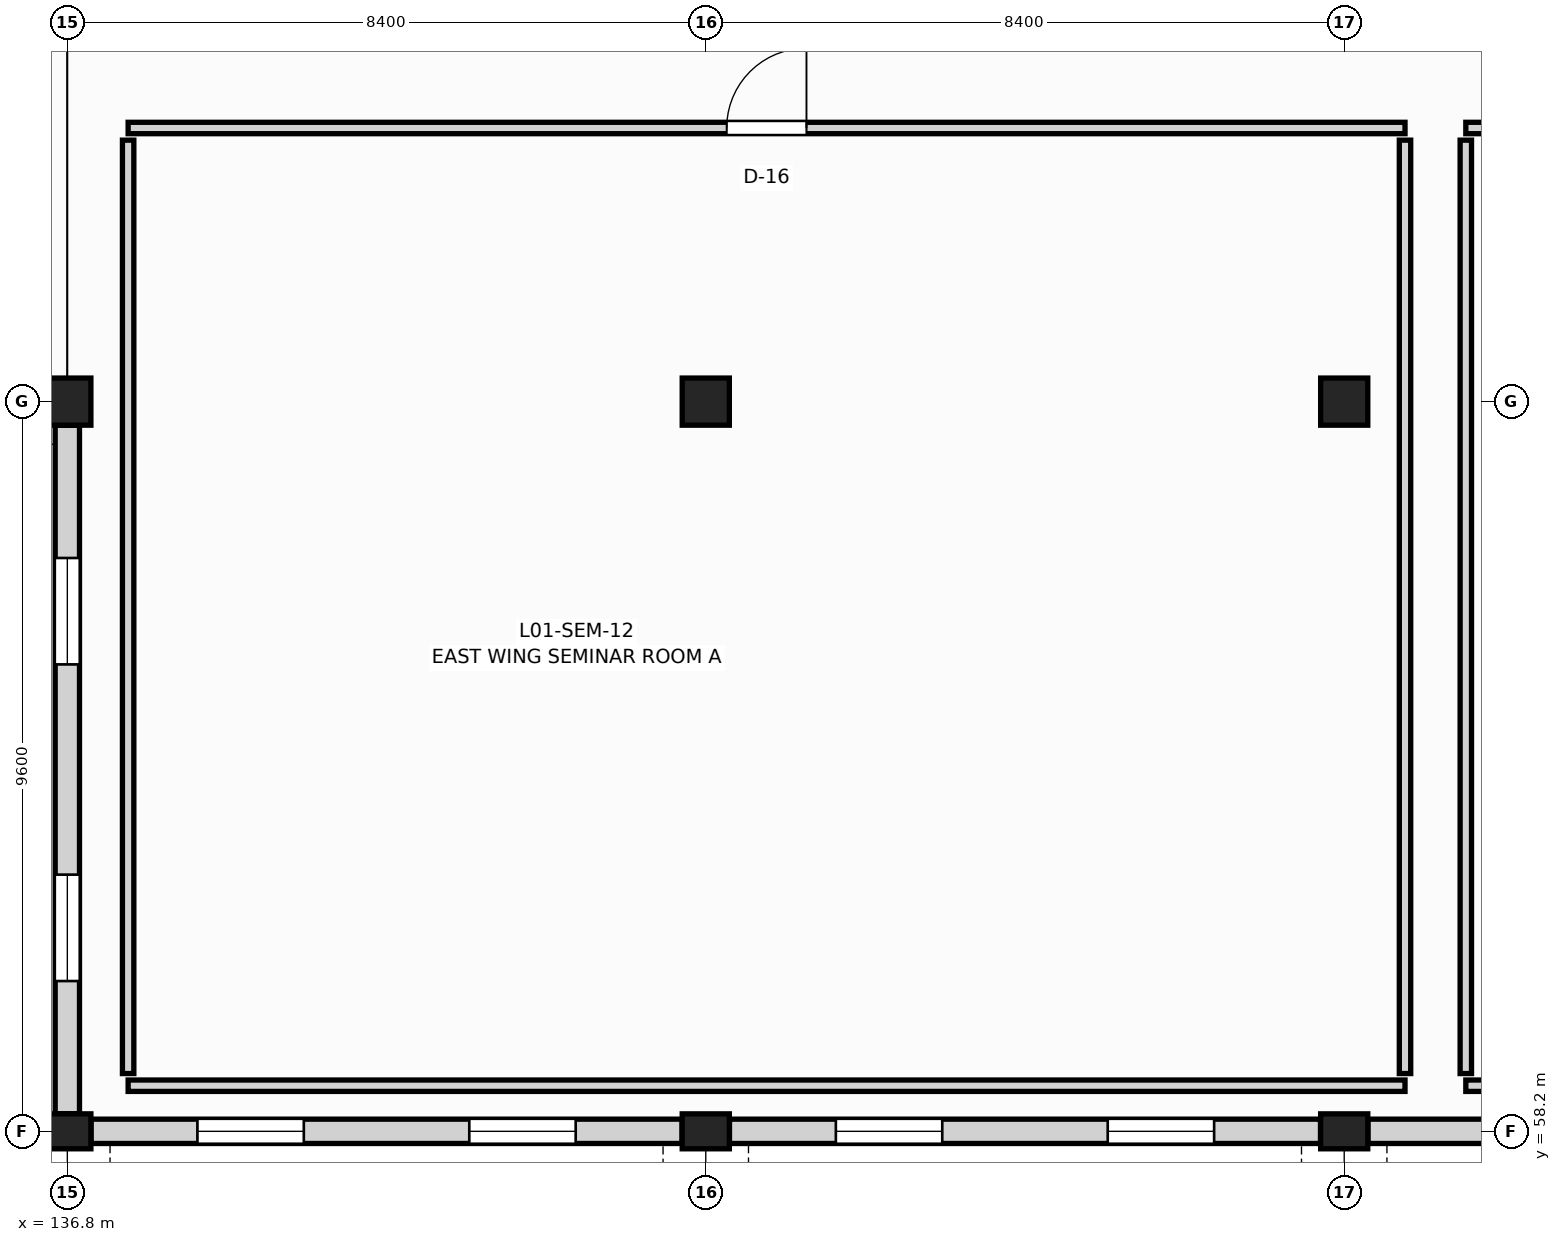
"""IFC4 building model, lengths in metres.
Left out: names, types, materials, properties, quantities, classifications, styles, units other than length and angle.
Written with IfcOpenShell. Run it as: python <this file> out.ifc"""

import sys

from ifc_helpers import new_model, si_unit, direction, frame, frame_2d, origin, origin_2d, place, context, subcontext, project, spatial, rectangle, extrude, element, fill, save


model = new_model("IFC4")
c1 = context("Model", 3, precision=1e-05, world=origin(), true_north=direction((0.0, 1.0)))
c2 = subcontext(c1, "Body", "Model", "MODEL_VIEW")
j1 = project(units=[si_unit("LENGTHUNIT", "METRE"), si_unit("PLANEANGLEUNIT", "RADIAN")], contexts=[c1])
p1 = place(None, origin())
s1 = spatial("IfcSite", under=j1, at=p1, CompositionType="ELEMENT")
p2 = place(p1, origin())
s2 = spatial("IfcBuilding", under=s1, at=p2, CompositionType="ELEMENT")
p3 = place(p2, frame((0.0, 0.0, 5.4)))
s3 = spatial("IfcBuildingStorey", under=s2, at=p3, CompositionType="ELEMENT", Elevation=5.4)
p4 = place(p3, frame((136.8, 58.2, 0.0), z_axis=(0.0, 0.0, 1.0), x_axis=(1.0, 0.0, 0.0)))
e1 = element("IfcColumn", 1, at=p4, inside=s3, PredefinedType="COLUMN", context=c2, shape_type="SweptSolid", body=[
    extrude(rectangle(XDim=0.62, YDim=0.46, at=origin_2d()), origin(), (0.0, 0.0, 1.0), 4.18),
])
p5 = place(p3, frame((136.8, 67.8, 0.0), z_axis=(0.0, 0.0, 1.0), x_axis=(1.0, 0.0, 0.0)))
e2 = element("IfcColumn", 2, at=p5, inside=s3, PredefinedType="COLUMN", context=c2, shape_type="SweptSolid", body=[
    extrude(rectangle(XDim=0.62, YDim=0.62, at=origin_2d()), origin(), (0.0, 0.0, 1.0), 4.18),
])
p6 = place(p3, frame((145.2, 58.2, 0.0), z_axis=(0.0, 0.0, 1.0), x_axis=(1.0, 0.0, 0.0)))
e3 = element("IfcColumn", 3, at=p6, inside=s3, PredefinedType="COLUMN", context=c2, shape_type="SweptSolid", body=[
    extrude(rectangle(XDim=0.62, YDim=0.46, at=origin_2d()), origin(), (0.0, 0.0, 1.0), 4.18),
])
p7 = place(p3, frame((145.2, 67.8, 0.0), z_axis=(0.0, 0.0, 1.0), x_axis=(1.0, 0.0, 0.0)))
e4 = element("IfcColumn", 4, at=p7, inside=s3, PredefinedType="COLUMN", context=c2, shape_type="SweptSolid", body=[
    extrude(rectangle(XDim=0.62, YDim=0.62, at=origin_2d()), origin(), (0.0, 0.0, 1.0), 4.18),
])
p8 = place(p3, frame((153.6, 58.2, 0.0), z_axis=(0.0, 0.0, 1.0), x_axis=(1.0, 0.0, 0.0)))
e5 = element("IfcColumn", 5, at=p8, inside=s3, PredefinedType="COLUMN", context=c2, shape_type="SweptSolid", body=[
    extrude(rectangle(XDim=0.62, YDim=0.46, at=origin_2d()), origin(), (0.0, 0.0, 1.0), 4.18),
])
p9 = place(p3, frame((153.6, 67.8, 0.0), z_axis=(0.0, 0.0, 1.0), x_axis=(1.0, 0.0, 0.0)))
e6 = element("IfcColumn", 6, at=p9, inside=s3, PredefinedType="COLUMN", context=c2, shape_type="SweptSolid", body=[
    extrude(rectangle(XDim=0.62, YDim=0.62, at=origin_2d()), origin(), (0.0, 0.0, 1.0), 4.18),
])
p10 = place(p3, frame((137.112, 58.2, 0.0), z_axis=(0.0, 0.0, 1.0), x_axis=(1.0, 0.0, 0.0)))
e7 = element("IfcWall", 7, at=p10, inside=s3, PredefinedType="SOLIDWALL", context=c2, shape_type="SweptSolid", body=[
    extrude(rectangle(XDim=7.776, YDim=0.32, at=frame_2d((3.888, 0.0))), origin(), (0.0, 0.0, 1.0), 3.38),
])
p11 = place(p10, frame((1.399, 0.0, 0.85)))
e8 = element("IfcOpeningElement", 8, at=p11, cuts=e7, PredefinedType="OPENING", context=c2, shape_type="SweptSolid", body=[
    extrude(rectangle(XDim=1.4, YDim=1.65, at=frame_2d((0.7, 0.825))), frame((0.0, 0.17, 0.0), z_axis=(0.0, -1.0, 0.0), x_axis=(1.0, 0.0, 0.0)), (0.0, 0.0, 1.0), 0.34),
])
p12 = place(p10, frame((4.977, 0.0, 0.85)))
e9 = element("IfcOpeningElement", 9, at=p12, cuts=e7, PredefinedType="OPENING", context=c2, shape_type="SweptSolid", body=[
    extrude(rectangle(XDim=1.4, YDim=1.65, at=frame_2d((0.7, 0.825))), frame((0.0, 0.17, 0.0), z_axis=(0.0, -1.0, 0.0), x_axis=(1.0, 0.0, 0.0)), (0.0, 0.0, 1.0), 0.34),
])
p13 = place(p3, frame((145.512, 58.2, 0.0), z_axis=(0.0, 0.0, 1.0), x_axis=(1.0, 0.0, 0.0)))
e10 = element("IfcWall", 10, at=p13, inside=s3, PredefinedType="SOLIDWALL", context=c2, shape_type="SweptSolid", body=[
    extrude(rectangle(XDim=7.776, YDim=0.32, at=frame_2d((3.888, 0.0))), origin(), (0.0, 0.0, 1.0), 3.38),
])
p14 = place(p13, frame((1.399, 0.0, 0.85)))
e11 = element("IfcOpeningElement", 11, at=p14, cuts=e10, PredefinedType="OPENING", context=c2, shape_type="SweptSolid", body=[
    extrude(rectangle(XDim=1.4, YDim=1.65, at=frame_2d((0.7, 0.825))), frame((0.0, 0.17, 0.0), z_axis=(0.0, -1.0, 0.0), x_axis=(1.0, 0.0, 0.0)), (0.0, 0.0, 1.0), 0.34),
])
p15 = place(p13, frame((4.977, 0.0, 0.85)))
e12 = element("IfcOpeningElement", 12, at=p15, cuts=e10, PredefinedType="OPENING", context=c2, shape_type="SweptSolid", body=[
    extrude(rectangle(XDim=1.4, YDim=1.65, at=frame_2d((0.7, 0.825))), frame((0.0, 0.17, 0.0), z_axis=(0.0, -1.0, 0.0), x_axis=(1.0, 0.0, 0.0)), (0.0, 0.0, 1.0), 0.34),
])
p16 = place(p3, frame((153.912, 58.2, 0.0), z_axis=(0.0, 0.0, 1.0), x_axis=(1.0, 0.0, 0.0)))
e13 = element("IfcWall", 13, at=p16, inside=s3, PredefinedType="SOLIDWALL", context=c2, shape_type="SweptSolid", body=[
    extrude(rectangle(XDim=7.776, YDim=0.32, at=frame_2d((3.888, 0.0))), origin(), (0.0, 0.0, 1.0), 3.38),
])
p17 = place(p16, frame((4.977, 0.0, 0.85)))
e14 = element("IfcOpeningElement", 14, at=p17, cuts=e13, PredefinedType="OPENING", context=c2, shape_type="SweptSolid", body=[
    extrude(rectangle(XDim=1.4, YDim=1.65, at=frame_2d((0.7, 0.825))), frame((0.0, 0.17, 0.0), z_axis=(0.0, -1.0, 0.0), x_axis=(1.0, 0.0, 0.0)), (0.0, 0.0, 1.0), 0.34),
])
p18 = place(p3, frame((136.8, 58.432, 0.0), z_axis=(0.0, 0.0, 1.0), x_axis=(0.0, 1.0, 0.0)))
e15 = element("IfcWall", 15, at=p18, inside=s3, PredefinedType="SOLIDWALL", context=c2, shape_type="SweptSolid", body=[
    extrude(rectangle(XDim=9.056, YDim=0.32, at=frame_2d((4.528, 0.0))), origin(), (0.0, 0.0, 1.0), 3.38),
])
p19 = place(p18, frame((1.745, 0.0, 0.85)))
e16 = element("IfcOpeningElement", 16, at=p19, cuts=e15, PredefinedType="OPENING", context=c2, shape_type="SweptSolid", body=[
    extrude(rectangle(XDim=1.4, YDim=1.65, at=frame_2d((0.7, 0.825))), frame((0.0, 0.17, 0.0), z_axis=(0.0, -1.0, 0.0), x_axis=(1.0, 0.0, 0.0)), (0.0, 0.0, 1.0), 0.34),
])
p20 = place(p18, frame((5.911, 0.0, 0.85)))
e17 = element("IfcOpeningElement", 17, at=p20, cuts=e15, PredefinedType="OPENING", context=c2, shape_type="SweptSolid", body=[
    extrude(rectangle(XDim=1.4, YDim=1.65, at=frame_2d((0.7, 0.825))), frame((0.0, 0.17, 0.0), z_axis=(0.0, -1.0, 0.0), x_axis=(1.0, 0.0, 0.0)), (0.0, 0.0, 1.0), 0.34),
])
p21 = place(p3, frame((137.6, 58.8, 0.0), z_axis=(0.0, 0.0, 1.0), x_axis=(1.0, 0.0, 0.0)))
e18 = element("IfcWall", 18, at=p21, inside=s3, PredefinedType="PARTITIONING", context=c2, shape_type="SweptSolid", body=[
    extrude(rectangle(XDim=16.8, YDim=0.15, at=frame_2d((8.4, 0.0))), origin(), (0.0, 0.0, 1.0), 3.22),
])
p22 = place(p3, frame((137.6, 71.4, 0.0), z_axis=(0.0, 0.0, 1.0), x_axis=(1.0, 0.0, 0.0)))
e19 = element("IfcWall", 19, at=p22, inside=s3, PredefinedType="PARTITIONING", context=c2, shape_type="SweptSolid", body=[
    extrude(rectangle(XDim=16.8, YDim=0.15, at=frame_2d((8.4, 0.0))), origin(), (0.0, 0.0, 1.0), 3.22),
])
p23 = place(p22, frame((7.875, 0.0, 0.0)))
e20 = element("IfcOpeningElement", 20, at=p23, cuts=e19, PredefinedType="OPENING", context=c2, shape_type="SweptSolid", body=[
    extrude(rectangle(XDim=1.05, YDim=2.2, at=frame_2d((0.525, 1.1))), frame((0.0, 0.085, 0.0), z_axis=(0.0, -1.0, 0.0), x_axis=(1.0, 0.0, 0.0)), (0.0, 0.0, 1.0), 0.17),
])
for number, where, z_axis, x_axis in (
    (21, (137.6, 58.96, 0.0), (0.0, 0.0, 1.0), (0.0, 1.0, 0.0)),
    (22, (154.4, 58.96, 0.0), (0.0, 0.0, 1.0), (0.0, 1.0, 0.0)),
):
    element("IfcWall", number, at=place(p3, frame(where, z_axis=z_axis, x_axis=x_axis)), inside=s3, PredefinedType="PARTITIONING", context=c2, shape_type="SweptSolid", body=[
        extrude(rectangle(XDim=12.28, YDim=0.15, at=frame_2d((6.14, 0.0))), origin(), (0.0, 0.0, 1.0), 3.22),
    ])
p24 = place(p3, frame((155.2, 58.8, 0.0), z_axis=(0.0, 0.0, 1.0), x_axis=(1.0, 0.0, 0.0)))
e23 = element("IfcWall", 23, at=p24, inside=s3, PredefinedType="PARTITIONING", context=c2, shape_type="SweptSolid", body=[
    extrude(rectangle(XDim=14.4, YDim=0.15, at=frame_2d((7.2, 0.0))), origin(), (0.0, 0.0, 1.0), 3.22),
])
p25 = place(p3, frame((155.2, 71.4, 0.0), z_axis=(0.0, 0.0, 1.0), x_axis=(1.0, 0.0, 0.0)))
e24 = element("IfcWall", 24, at=p25, inside=s3, PredefinedType="PARTITIONING", context=c2, shape_type="SweptSolid", body=[
    extrude(rectangle(XDim=14.4, YDim=0.15, at=frame_2d((7.2, 0.0))), origin(), (0.0, 0.0, 1.0), 3.22),
])
p26 = place(p25, frame((6.675, 0.0, 0.0)))
e25 = element("IfcOpeningElement", 25, at=p26, cuts=e24, PredefinedType="OPENING", context=c2, shape_type="SweptSolid", body=[
    extrude(rectangle(XDim=1.05, YDim=2.2, at=frame_2d((0.525, 1.1))), frame((0.0, 0.085, 0.0), z_axis=(0.0, -1.0, 0.0), x_axis=(1.0, 0.0, 0.0)), (0.0, 0.0, 1.0), 0.17),
])
p27 = place(p3, frame((155.2, 58.96, 0.0), z_axis=(0.0, 0.0, 1.0), x_axis=(0.0, 1.0, 0.0)))
e26 = element("IfcWall", 26, at=p27, inside=s3, PredefinedType="PARTITIONING", context=c2, shape_type="SweptSolid", body=[
    extrude(rectangle(XDim=12.28, YDim=0.15, at=frame_2d((6.14, 0.0))), origin(), (0.0, 0.0, 1.0), 3.22),
])
p28 = place(p11, origin())
e27 = element("IfcWindow", 27, at=p28, inside=s3, PartitioningType="SINGLE_PANEL", PredefinedType="WINDOW", context=c2, shape_type="SweptSolid", body=[
    extrude(rectangle(XDim=1.4, YDim=1.65, at=frame_2d((0.7, 0.825))), frame((0.0, 0.03, 0.0), z_axis=(0.0, -1.0, 0.0), x_axis=(1.0, 0.0, 0.0)), (0.0, 0.0, 1.0), 0.06),
])
fill(e8, e27)
p29 = place(p12, origin())
e28 = element("IfcWindow", 28, at=p29, inside=s3, PartitioningType="SINGLE_PANEL", PredefinedType="WINDOW", context=c2, shape_type="SweptSolid", body=[
    extrude(rectangle(XDim=1.4, YDim=1.65, at=frame_2d((0.7, 0.825))), frame((0.0, 0.03, 0.0), z_axis=(0.0, -1.0, 0.0), x_axis=(1.0, 0.0, 0.0)), (0.0, 0.0, 1.0), 0.06),
])
fill(e9, e28)
p30 = place(p14, origin())
e29 = element("IfcWindow", 29, at=p30, inside=s3, PartitioningType="SINGLE_PANEL", PredefinedType="WINDOW", context=c2, shape_type="SweptSolid", body=[
    extrude(rectangle(XDim=1.4, YDim=1.65, at=frame_2d((0.7, 0.825))), frame((0.0, 0.03, 0.0), z_axis=(0.0, -1.0, 0.0), x_axis=(1.0, 0.0, 0.0)), (0.0, 0.0, 1.0), 0.06),
])
fill(e11, e29)
p31 = place(p15, origin())
e30 = element("IfcWindow", 30, at=p31, inside=s3, PartitioningType="SINGLE_PANEL", PredefinedType="WINDOW", context=c2, shape_type="SweptSolid", body=[
    extrude(rectangle(XDim=1.4, YDim=1.65, at=frame_2d((0.7, 0.825))), frame((0.0, 0.03, 0.0), z_axis=(0.0, -1.0, 0.0), x_axis=(1.0, 0.0, 0.0)), (0.0, 0.0, 1.0), 0.06),
])
fill(e12, e30)
p32 = place(p19, origin())
e31 = element("IfcWindow", 31, at=p32, inside=s3, PartitioningType="SINGLE_PANEL", PredefinedType="WINDOW", context=c2, shape_type="SweptSolid", body=[
    extrude(rectangle(XDim=1.4, YDim=1.65, at=frame_2d((0.7, 0.825))), frame((0.0, 0.03, 0.0), z_axis=(0.0, -1.0, 0.0), x_axis=(1.0, 0.0, 0.0)), (0.0, 0.0, 1.0), 0.06),
])
fill(e16, e31)
p33 = place(p20, origin())
e32 = element("IfcWindow", 32, at=p33, inside=s3, PartitioningType="SINGLE_PANEL", PredefinedType="WINDOW", context=c2, shape_type="SweptSolid", body=[
    extrude(rectangle(XDim=1.4, YDim=1.65, at=frame_2d((0.7, 0.825))), frame((0.0, 0.03, 0.0), z_axis=(0.0, -1.0, 0.0), x_axis=(1.0, 0.0, 0.0)), (0.0, 0.0, 1.0), 0.06),
])
fill(e17, e32)
p34 = place(p23, origin())
e33 = element("IfcDoor", 33, at=p34, inside=s3, OperationType="SINGLE_SWING_RIGHT", PredefinedType="DOOR", context=c2, shape_type="SweptSolid", body=[
    extrude(rectangle(XDim=1.05, YDim=2.2, at=frame_2d((0.525, 1.1))), frame((0.0, 0.025, 0.0), z_axis=(0.0, -1.0, 0.0), x_axis=(1.0, 0.0, 0.0)), (0.0, 0.0, 1.0), 0.05),
])
fill(e20, e33)
save(model, sys.argv[1])
